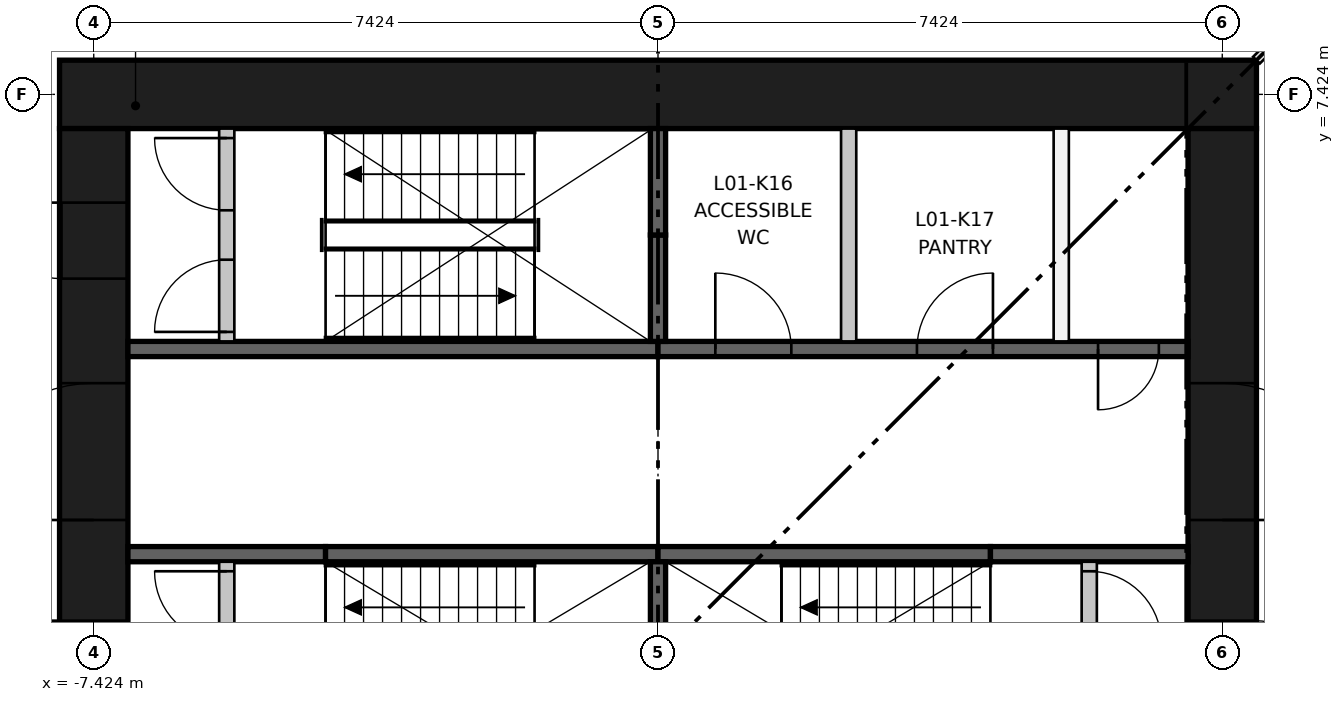
"""IFC4 building model, lengths in metres.
Left out: names, types, materials, properties, quantities, classifications, styles, units other than length and angle.
Written with IfcOpenShell. Run it as: python <this file> out.ifc"""

import sys

from ifc_helpers import new_model, si_unit, direction, frame, frame_2d, origin, place, context, subcontext, project, spatial, rectangle, extrude, element, fill, save


model = new_model("IFC4")
c1 = context("Model", 3, precision=1e-05, world=origin(), true_north=direction((0.0, 1.0)))
c2 = subcontext(c1, "Body", "Model", "MODEL_VIEW")
j1 = project(units=[si_unit("LENGTHUNIT", "METRE"), si_unit("PLANEANGLEUNIT", "RADIAN")], contexts=[c1])
p1 = place(None, origin())
s1 = spatial("IfcSite", under=j1, at=p1, CompositionType="ELEMENT")
p2 = place(p1, origin())
s2 = spatial("IfcBuilding", under=s1, at=p2, CompositionType="ELEMENT")
p3 = place(p2, frame((0.0, 0.0, 5.2)))
s3 = spatial("IfcBuildingStorey", under=s2, at=p3, CompositionType="ELEMENT", Elevation=5.2)
p4 = place(p3, frame((-7.874, 7.424, 0.0), z_axis=(0.0, 0.0, 1.0), x_axis=(1.0, 0.0, 0.0)))
e1 = element("IfcWall", 1, at=p4, inside=s3, PredefinedType="SHEAR", context=c2, shape_type="SweptSolid", body=[
    extrude(rectangle(XDim=15.748, YDim=0.9, at=frame_2d((7.874, 0.0))), origin(), (0.0, 0.0, 1.0), 4.7),
])
p5 = place(p3, frame((-7.424, -6.974, 0.0), z_axis=(0.0, 0.0, 1.0), x_axis=(0.0, 1.0, 0.0)))
e2 = element("IfcWall", 2, at=p5, inside=s3, PredefinedType="SHEAR", context=c2, shape_type="SweptSolid", body=[
    extrude(rectangle(XDim=13.948, YDim=0.9, at=frame_2d((6.974, 0.0))), origin(), (0.0, 0.0, 1.0), 4.7),
])
p6 = place(p5, frame((6.474, 0.0, 0.0)))
e3 = element("IfcOpeningElement", 3, at=p6, cuts=e2, PredefinedType="OPENING", context=c2, shape_type="SweptSolid", body=[
    extrude(rectangle(XDim=1.0, YDim=2.1, at=frame_2d((0.5, 1.05))), frame((0.0, 0.46, 0.0), z_axis=(0.0, -1.0, 0.0), x_axis=(1.0, 0.0, 0.0)), (0.0, 0.0, 1.0), 0.92),
])
p7 = place(p5, frame((3.35, 0.0, 0.0)))
e4 = element("IfcOpeningElement", 4, at=p7, cuts=e2, PredefinedType="OPENING", context=c2, shape_type="SweptSolid", body=[
    extrude(rectangle(XDim=1.8, YDim=2.1, at=frame_2d((0.9, 1.05))), frame((0.0, 0.46, 0.0), z_axis=(0.0, -1.0, 0.0), x_axis=(1.0, 0.0, 0.0)), (0.0, 0.0, 1.0), 0.92),
])
p8 = place(p5, frame((8.799, 0.0, 0.0)))
e5 = element("IfcOpeningElement", 5, at=p8, cuts=e2, PredefinedType="OPENING", context=c2, shape_type="SweptSolid", body=[
    extrude(rectangle(XDim=1.8, YDim=2.1, at=frame_2d((0.9, 1.05))), frame((0.0, 0.46, 0.0), z_axis=(0.0, -1.0, 0.0), x_axis=(1.0, 0.0, 0.0)), (0.0, 0.0, 1.0), 0.92),
])
p9 = place(p5, frame((11.974, 0.0, 0.0)))
e6 = element("IfcOpeningElement", 6, at=p9, cuts=e2, PredefinedType="OPENING", context=c2, shape_type="SweptSolid", body=[
    extrude(rectangle(XDim=1.0, YDim=2.1, at=frame_2d((0.5, 1.05))), frame((0.0, 0.46, 0.0), z_axis=(0.0, -1.0, 0.0), x_axis=(1.0, 0.0, 0.0)), (0.0, 0.0, 1.0), 0.92),
])
p10 = place(p3, frame((7.424, -6.974, 0.0), z_axis=(0.0, 0.0, 1.0), x_axis=(0.0, 1.0, 0.0)))
e7 = element("IfcWall", 7, at=p10, inside=s3, PredefinedType="SHEAR", context=c2, shape_type="SweptSolid", body=[
    extrude(rectangle(XDim=13.948, YDim=0.9, at=frame_2d((6.974, 0.0))), origin(), (0.0, 0.0, 1.0), 4.7),
])
p11 = place(p10, frame((6.474, 0.0, 0.0)))
e8 = element("IfcOpeningElement", 8, at=p11, cuts=e7, PredefinedType="OPENING", context=c2, shape_type="SweptSolid", body=[
    extrude(rectangle(XDim=1.0, YDim=2.1, at=frame_2d((0.5, 1.05))), frame((0.0, 0.46, 0.0), z_axis=(0.0, -1.0, 0.0), x_axis=(1.0, 0.0, 0.0)), (0.0, 0.0, 1.0), 0.92),
])
p12 = place(p10, frame((3.35, 0.0, 0.0)))
e9 = element("IfcOpeningElement", 9, at=p12, cuts=e7, PredefinedType="OPENING", context=c2, shape_type="SweptSolid", body=[
    extrude(rectangle(XDim=1.8, YDim=2.1, at=frame_2d((0.9, 1.05))), frame((0.0, 0.46, 0.0), z_axis=(0.0, -1.0, 0.0), x_axis=(1.0, 0.0, 0.0)), (0.0, 0.0, 1.0), 0.92),
])
p13 = place(p10, frame((8.799, 0.0, 0.0)))
e10 = element("IfcOpeningElement", 10, at=p13, cuts=e7, PredefinedType="OPENING", context=c2, shape_type="SweptSolid", body=[
    extrude(rectangle(XDim=1.8, YDim=2.1, at=frame_2d((0.9, 1.05))), frame((0.0, 0.46, 0.0), z_axis=(0.0, -1.0, 0.0), x_axis=(1.0, 0.0, 0.0)), (0.0, 0.0, 1.0), 0.92),
])
p14 = place(p3, frame((-6.974, 4.074, 0.0), z_axis=(0.0, 0.0, 1.0), x_axis=(1.0, 0.0, 0.0)))
e11 = element("IfcWall", 11, at=p14, inside=s3, PredefinedType="SHEAR", context=c2, shape_type="SweptSolid", body=[
    extrude(rectangle(XDim=6.974, YDim=0.2, at=frame_2d((3.487, 0.0))), origin(), (0.0, 0.0, 1.0), 4.3),
])
p15 = place(p3, frame((0.0, 4.074, 0.0), z_axis=(0.0, 0.0, 1.0), x_axis=(1.0, 0.0, 0.0)))
e12 = element("IfcWall", 12, at=p15, inside=s3, PredefinedType="SHEAR", context=c2, shape_type="SweptSolid", body=[
    extrude(rectangle(XDim=6.974, YDim=0.2, at=frame_2d((3.487, 0.0))), origin(), (0.0, 0.0, 1.0), 4.3),
])
p16 = place(p15, frame((0.754, 0.0, 0.0)))
e13 = element("IfcOpeningElement", 13, at=p16, cuts=e12, PredefinedType="OPENING", context=c2, shape_type="SweptSolid", body=[
    extrude(rectangle(XDim=1.0, YDim=2.1, at=frame_2d((0.5, 1.05))), frame((0.0, 0.11, 0.0), z_axis=(0.0, -1.0, 0.0), x_axis=(1.0, 0.0, 0.0)), (0.0, 0.0, 1.0), 0.22),
])
p17 = place(p15, frame((3.407, 0.0, 0.0)))
e14 = element("IfcOpeningElement", 14, at=p17, cuts=e12, PredefinedType="OPENING", context=c2, shape_type="SweptSolid", body=[
    extrude(rectangle(XDim=1.0, YDim=2.1, at=frame_2d((0.5, 1.05))), frame((0.0, 0.11, 0.0), z_axis=(0.0, -1.0, 0.0), x_axis=(1.0, 0.0, 0.0)), (0.0, 0.0, 1.0), 0.22),
])
p18 = place(p15, frame((5.79, 0.0, 0.0)))
e15 = element("IfcOpeningElement", 15, at=p18, cuts=e12, PredefinedType="OPENING", context=c2, shape_type="SweptSolid", body=[
    extrude(rectangle(XDim=0.8, YDim=2.1, at=frame_2d((0.4, 1.05))), frame((0.0, 0.11, 0.0), z_axis=(0.0, -1.0, 0.0), x_axis=(1.0, 0.0, 0.0)), (0.0, 0.0, 1.0), 0.22),
])
p19 = place(p3, frame((-6.974, 1.375, 0.0), z_axis=(0.0, 0.0, 1.0), x_axis=(1.0, 0.0, 0.0)))
e16 = element("IfcWall", 16, at=p19, inside=s3, PredefinedType="SHEAR", context=c2, shape_type="SweptSolid", body=[
    extrude(rectangle(XDim=2.6, YDim=0.2, at=frame_2d((1.3, 0.0))), origin(), (0.0, 0.0, 1.0), 4.3),
])
for number, where, z_axis, x_axis in (
    (17, (-4.374, 1.375, 0.0), (0.0, 0.0, 1.0), (1.0, 0.0, 0.0)),
    (18, (0.0, 1.375, 0.0), (0.0, 0.0, 1.0), (1.0, 0.0, 0.0)),
):
    element("IfcWall", number, at=place(p3, frame(where, z_axis=z_axis, x_axis=x_axis)), inside=s3, PredefinedType="SHEAR", context=c2, shape_type="SweptSolid", body=[
        extrude(rectangle(XDim=4.374, YDim=0.2, at=frame_2d((2.187, 0.0))), origin(), (0.0, 0.0, 1.0), 4.3),
    ])
p20 = place(p3, frame((4.374, 1.375, 0.0), z_axis=(0.0, 0.0, 1.0), x_axis=(1.0, 0.0, 0.0)))
e19 = element("IfcWall", 19, at=p20, inside=s3, PredefinedType="SHEAR", context=c2, shape_type="SweptSolid", body=[
    extrude(rectangle(XDim=2.6, YDim=0.2, at=frame_2d((1.3, 0.0))), origin(), (0.0, 0.0, 1.0), 4.3),
])
p21 = place(p3, frame((0.0, -1.275, 0.0), z_axis=(0.0, 0.0, 1.0), x_axis=(0.0, 1.0, 0.0)))
e20 = element("IfcWall", 20, at=p21, inside=s3, PredefinedType="SHEAR", context=c2, shape_type="SweptSolid", body=[
    extrude(rectangle(XDim=2.55, YDim=0.2, at=frame_2d((1.275, 0.0))), origin(), (0.0, 0.0, 1.0), 4.3),
])
p22 = place(p3, frame((0.0, 4.174, 0.0), z_axis=(0.0, 0.0, 1.0), x_axis=(0.0, 1.0, 0.0)))
e21 = element("IfcWall", 21, at=p22, inside=s3, PredefinedType="SHEAR", context=c2, shape_type="SweptSolid", body=[
    extrude(rectangle(XDim=1.4, YDim=0.2, at=frame_2d((0.7, 0.0))), origin(), (0.0, 0.0, 1.0), 4.3),
])
p23 = place(p3, frame((0.0, 5.574, 0.0), z_axis=(0.0, 0.0, 1.0), x_axis=(0.0, 1.0, 0.0)))
e22 = element("IfcWall", 22, at=p23, inside=s3, PredefinedType="SHEAR", context=c2, shape_type="SweptSolid", body=[
    extrude(rectangle(XDim=1.4, YDim=0.2, at=frame_2d((0.7, 0.0))), origin(), (0.0, 0.0, 1.0), 4.3),
])
for number, where, z_axis, x_axis in (
    (23, (2.509, 4.174, 0.0), (0.0, 0.0, 1.0), (0.0, 1.0, 0.0)),
    (24, (5.305, 4.174, 0.0), (0.0, 0.0, 1.0), (0.0, 1.0, 0.0)),
):
    element("IfcWall", number, at=place(p3, frame(where, z_axis=z_axis, x_axis=x_axis)), inside=s3, PredefinedType="PARTITIONING", context=c2, shape_type="SweptSolid", body=[
        extrude(rectangle(XDim=2.8, YDim=0.2, at=frame_2d((1.4, 0.0))), origin(), (0.0, 0.0, 1.0), 4.3),
    ])
p24 = place(p3, frame((-5.674, -1.275, 0.0), z_axis=(0.0, 0.0, 1.0), x_axis=(0.0, 1.0, 0.0)))
e25 = element("IfcWall", 25, at=p24, inside=s3, PredefinedType="PARTITIONING", context=c2, shape_type="SweptSolid", body=[
    extrude(rectangle(XDim=2.55, YDim=0.2, at=frame_2d((1.275, 0.0))), origin(), (0.0, 0.0, 1.0), 4.3),
])
p25 = place(p24, frame((0.125, 0.0, 0.0)))
e26 = element("IfcOpeningElement", 26, at=p25, cuts=e25, PredefinedType="OPENING", context=c2, shape_type="SweptSolid", body=[
    extrude(rectangle(XDim=0.95, YDim=2.1, at=frame_2d((0.475, 1.05))), frame((0.0, 0.11, 0.0), z_axis=(0.0, -1.0, 0.0), x_axis=(1.0, 0.0, 0.0)), (0.0, 0.0, 1.0), 0.22),
])
p26 = place(p24, frame((1.475, 0.0, 0.0)))
e27 = element("IfcOpeningElement", 27, at=p26, cuts=e25, PredefinedType="OPENING", context=c2, shape_type="SweptSolid", body=[
    extrude(rectangle(XDim=0.95, YDim=2.1, at=frame_2d((0.475, 1.05))), frame((0.0, 0.11, 0.0), z_axis=(0.0, -1.0, 0.0), x_axis=(1.0, 0.0, 0.0)), (0.0, 0.0, 1.0), 0.22),
])
p27 = place(p3, frame((5.674, -1.275, 0.0), z_axis=(0.0, 0.0, 1.0), x_axis=(0.0, 1.0, 0.0)))
e28 = element("IfcWall", 28, at=p27, inside=s3, PredefinedType="PARTITIONING", context=c2, shape_type="SweptSolid", body=[
    extrude(rectangle(XDim=2.55, YDim=0.2, at=frame_2d((1.275, 0.0))), origin(), (0.0, 0.0, 1.0), 4.3),
])
p28 = place(p27, frame((0.125, 0.0, 0.0)))
e29 = element("IfcOpeningElement", 29, at=p28, cuts=e28, PredefinedType="OPENING", context=c2, shape_type="SweptSolid", body=[
    extrude(rectangle(XDim=0.95, YDim=2.1, at=frame_2d((0.475, 1.05))), frame((0.0, 0.11, 0.0), z_axis=(0.0, -1.0, 0.0), x_axis=(1.0, 0.0, 0.0)), (0.0, 0.0, 1.0), 0.22),
])
p29 = place(p27, frame((1.475, 0.0, 0.0)))
e30 = element("IfcOpeningElement", 30, at=p29, cuts=e28, PredefinedType="OPENING", context=c2, shape_type="SweptSolid", body=[
    extrude(rectangle(XDim=0.95, YDim=2.1, at=frame_2d((0.475, 1.05))), frame((0.0, 0.11, 0.0), z_axis=(0.0, -1.0, 0.0), x_axis=(1.0, 0.0, 0.0)), (0.0, 0.0, 1.0), 0.22),
])
p30 = place(p3, frame((-5.674, 4.174, 0.0), z_axis=(0.0, 0.0, 1.0), x_axis=(0.0, 1.0, 0.0)))
e31 = element("IfcWall", 31, at=p30, inside=s3, PredefinedType="PARTITIONING", context=c2, shape_type="SweptSolid", body=[
    extrude(rectangle(XDim=2.8, YDim=0.2, at=frame_2d((1.4, 0.0))), origin(), (0.0, 0.0, 1.0), 4.3),
])
p31 = place(p30, frame((0.125, 0.0, 0.0)))
e32 = element("IfcOpeningElement", 32, at=p31, cuts=e31, PredefinedType="OPENING", context=c2, shape_type="SweptSolid", body=[
    extrude(rectangle(XDim=0.95, YDim=2.1, at=frame_2d((0.475, 1.05))), frame((0.0, 0.11, 0.0), z_axis=(0.0, -1.0, 0.0), x_axis=(1.0, 0.0, 0.0)), (0.0, 0.0, 1.0), 0.22),
])
p32 = place(p30, frame((1.725, 0.0, 0.0)))
e33 = element("IfcOpeningElement", 33, at=p32, cuts=e31, PredefinedType="OPENING", context=c2, shape_type="SweptSolid", body=[
    extrude(rectangle(XDim=0.95, YDim=2.1, at=frame_2d((0.475, 1.05))), frame((0.0, 0.11, 0.0), z_axis=(0.0, -1.0, 0.0), x_axis=(1.0, 0.0, 0.0)), (0.0, 0.0, 1.0), 0.22),
])
p33 = place(p3, frame((7.874, 7.874, 0.0), z_axis=(0.0, 0.0, 1.0), x_axis=(0.707106781187, 0.707106781187, 0.0)))
e34 = element("IfcWall", 34, at=p33, inside=s3, PredefinedType="PARTITIONING", context=c2, shape_type="SweptSolid", body=[
    extrude(rectangle(XDim=2.165, YDim=0.125, at=frame_2d((1.082, 0.0))), origin(), (0.0, 0.0, 1.0), 4.3),
])
p34 = place(p33, frame((0.6, 0.0, 0.0)))
e35 = element("IfcOpeningElement", 35, at=p34, cuts=e34, PredefinedType="OPENING", context=c2, shape_type="SweptSolid", body=[
    extrude(rectangle(XDim=1.0, YDim=2.1, at=frame_2d((0.5, 1.05))), frame((0.0, 0.073, 0.0), z_axis=(0.0, -1.0, 0.0), x_axis=(1.0, 0.0, 0.0)), (0.0, 0.0, 1.0), 0.145),
])
p35 = place(p26, origin())
e36 = element("IfcDoor", 36, at=p35, inside=s3, OperationType="SINGLE_SWING_RIGHT", PredefinedType="DOOR", context=c2, shape_type="SweptSolid", body=[
    extrude(rectangle(XDim=0.95, YDim=2.1, at=frame_2d((0.475, 1.05))), frame((0.0, 0.025, 0.0), z_axis=(0.0, -1.0, 0.0), x_axis=(1.0, 0.0, 0.0)), (0.0, 0.0, 1.0), 0.05),
])
fill(e27, e36)
p36 = place(p29, frame((0.95, 0.0, 0.0), z_axis=(0.0, 0.0, 1.0), x_axis=(-1.0, 0.0, 0.0)))
e37 = element("IfcDoor", 37, at=p36, inside=s3, OperationType="SINGLE_SWING_LEFT", PredefinedType="DOOR", context=c2, shape_type="SweptSolid", body=[
    extrude(rectangle(XDim=0.95, YDim=2.1, at=frame_2d((0.475, 1.05))), frame((0.0, 0.025, 0.0), z_axis=(0.0, -1.0, 0.0), x_axis=(1.0, 0.0, 0.0)), (0.0, 0.0, 1.0), 0.05),
])
fill(e30, e37)
p37 = place(p31, origin())
e38 = element("IfcDoor", 38, at=p37, inside=s3, OperationType="SINGLE_SWING_LEFT", PredefinedType="DOOR", context=c2, shape_type="SweptSolid", body=[
    extrude(rectangle(XDim=0.95, YDim=2.1, at=frame_2d((0.475, 1.05))), frame((0.0, 0.025, 0.0), z_axis=(0.0, -1.0, 0.0), x_axis=(1.0, 0.0, 0.0)), (0.0, 0.0, 1.0), 0.05),
])
fill(e32, e38)
p38 = place(p32, origin())
e39 = element("IfcDoor", 39, at=p38, inside=s3, OperationType="SINGLE_SWING_RIGHT", PredefinedType="DOOR", context=c2, shape_type="SweptSolid", body=[
    extrude(rectangle(XDim=0.95, YDim=2.1, at=frame_2d((0.475, 1.05))), frame((0.0, 0.025, 0.0), z_axis=(0.0, -1.0, 0.0), x_axis=(1.0, 0.0, 0.0)), (0.0, 0.0, 1.0), 0.05),
])
fill(e33, e39)
p39 = place(p16, origin())
e40 = element("IfcDoor", 40, at=p39, inside=s3, OperationType="SINGLE_SWING_LEFT", PredefinedType="DOOR", context=c2, shape_type="SweptSolid", body=[
    extrude(rectangle(XDim=1.0, YDim=2.1, at=frame_2d((0.5, 1.05))), frame((0.0, 0.025, 0.0), z_axis=(0.0, -1.0, 0.0), x_axis=(1.0, 0.0, 0.0)), (0.0, 0.0, 1.0), 0.05),
])
fill(e13, e40)
p40 = place(p17, origin())
e41 = element("IfcDoor", 41, at=p40, inside=s3, OperationType="SINGLE_SWING_RIGHT", PredefinedType="DOOR", context=c2, shape_type="SweptSolid", body=[
    extrude(rectangle(XDim=1.0, YDim=2.1, at=frame_2d((0.5, 1.05))), frame((0.0, 0.025, 0.0), z_axis=(0.0, -1.0, 0.0), x_axis=(1.0, 0.0, 0.0)), (0.0, 0.0, 1.0), 0.05),
])
fill(e14, e41)
p41 = place(p18, frame((0.8, 0.0, 0.0), z_axis=(0.0, 0.0, 1.0), x_axis=(-1.0, 0.0, 0.0)))
e42 = element("IfcDoor", 42, at=p41, inside=s3, OperationType="SINGLE_SWING_LEFT", PredefinedType="DOOR", context=c2, shape_type="SweptSolid", body=[
    extrude(rectangle(XDim=0.8, YDim=2.1, at=frame_2d((0.4, 1.05))), frame((0.0, 0.025, 0.0), z_axis=(0.0, -1.0, 0.0), x_axis=(1.0, 0.0, 0.0)), (0.0, 0.0, 1.0), 0.05),
])
fill(e15, e42)
p42 = place(p6, origin())
e43 = element("IfcDoor", 43, at=p42, inside=s3, OperationType="SINGLE_SWING_RIGHT", PredefinedType="DOOR", context=c2, shape_type="SweptSolid", body=[
    extrude(rectangle(XDim=1.0, YDim=2.1, at=frame_2d((0.5, 1.05))), frame((0.0, 0.45, 0.0), z_axis=(0.0, -1.0, 0.0), x_axis=(1.0, 0.0, 0.0)), (0.0, 0.0, 1.0), 0.05),
])
fill(e3, e43)
p43 = place(p8, origin())
e44 = element("IfcDoor", 44, at=p43, inside=s3, OperationType="DOUBLE_DOOR_SINGLE_SWING", PredefinedType="DOOR", context=c2, shape_type="SweptSolid", body=[
    extrude(rectangle(XDim=1.8, YDim=2.1, at=frame_2d((0.9, 1.05))), frame((0.0, 0.025, 0.0), z_axis=(0.0, -1.0, 0.0), x_axis=(1.0, 0.0, 0.0)), (0.0, 0.0, 1.0), 0.05),
])
fill(e5, e44)
p44 = place(p9, origin())
e45 = element("IfcDoor", 45, at=p44, inside=s3, OperationType="SINGLE_SWING_RIGHT", PredefinedType="DOOR", context=c2, shape_type="SweptSolid", body=[
    extrude(rectangle(XDim=1.0, YDim=2.1, at=frame_2d((0.5, 1.05))), frame((0.0, 0.45, 0.0), z_axis=(0.0, -1.0, 0.0), x_axis=(1.0, 0.0, 0.0)), (0.0, 0.0, 1.0), 0.05),
])
fill(e6, e45)
p45 = place(p11, frame((1.0, 0.0, 0.0), z_axis=(0.0, 0.0, 1.0), x_axis=(-1.0, 0.0, 0.0)))
e46 = element("IfcDoor", 46, at=p45, inside=s3, OperationType="SINGLE_SWING_LEFT", PredefinedType="DOOR", context=c2, shape_type="SweptSolid", body=[
    extrude(rectangle(XDim=1.0, YDim=2.1, at=frame_2d((0.5, 1.05))), frame((0.0, 0.45, 0.0), z_axis=(0.0, -1.0, 0.0), x_axis=(1.0, 0.0, 0.0)), (0.0, 0.0, 1.0), 0.05),
])
fill(e8, e46)
p46 = place(p13, frame((1.8, 0.0, 0.0), z_axis=(0.0, 0.0, 1.0), x_axis=(-1.0, 0.0, 0.0)))
e47 = element("IfcDoor", 47, at=p46, inside=s3, OperationType="DOUBLE_DOOR_SINGLE_SWING", PredefinedType="DOOR", context=c2, shape_type="SweptSolid", body=[
    extrude(rectangle(XDim=1.8, YDim=2.1, at=frame_2d((0.9, 1.05))), frame((0.0, 0.025, 0.0), z_axis=(0.0, -1.0, 0.0), x_axis=(1.0, 0.0, 0.0)), (0.0, 0.0, 1.0), 0.05),
])
fill(e10, e47)
save(model, sys.argv[1])
